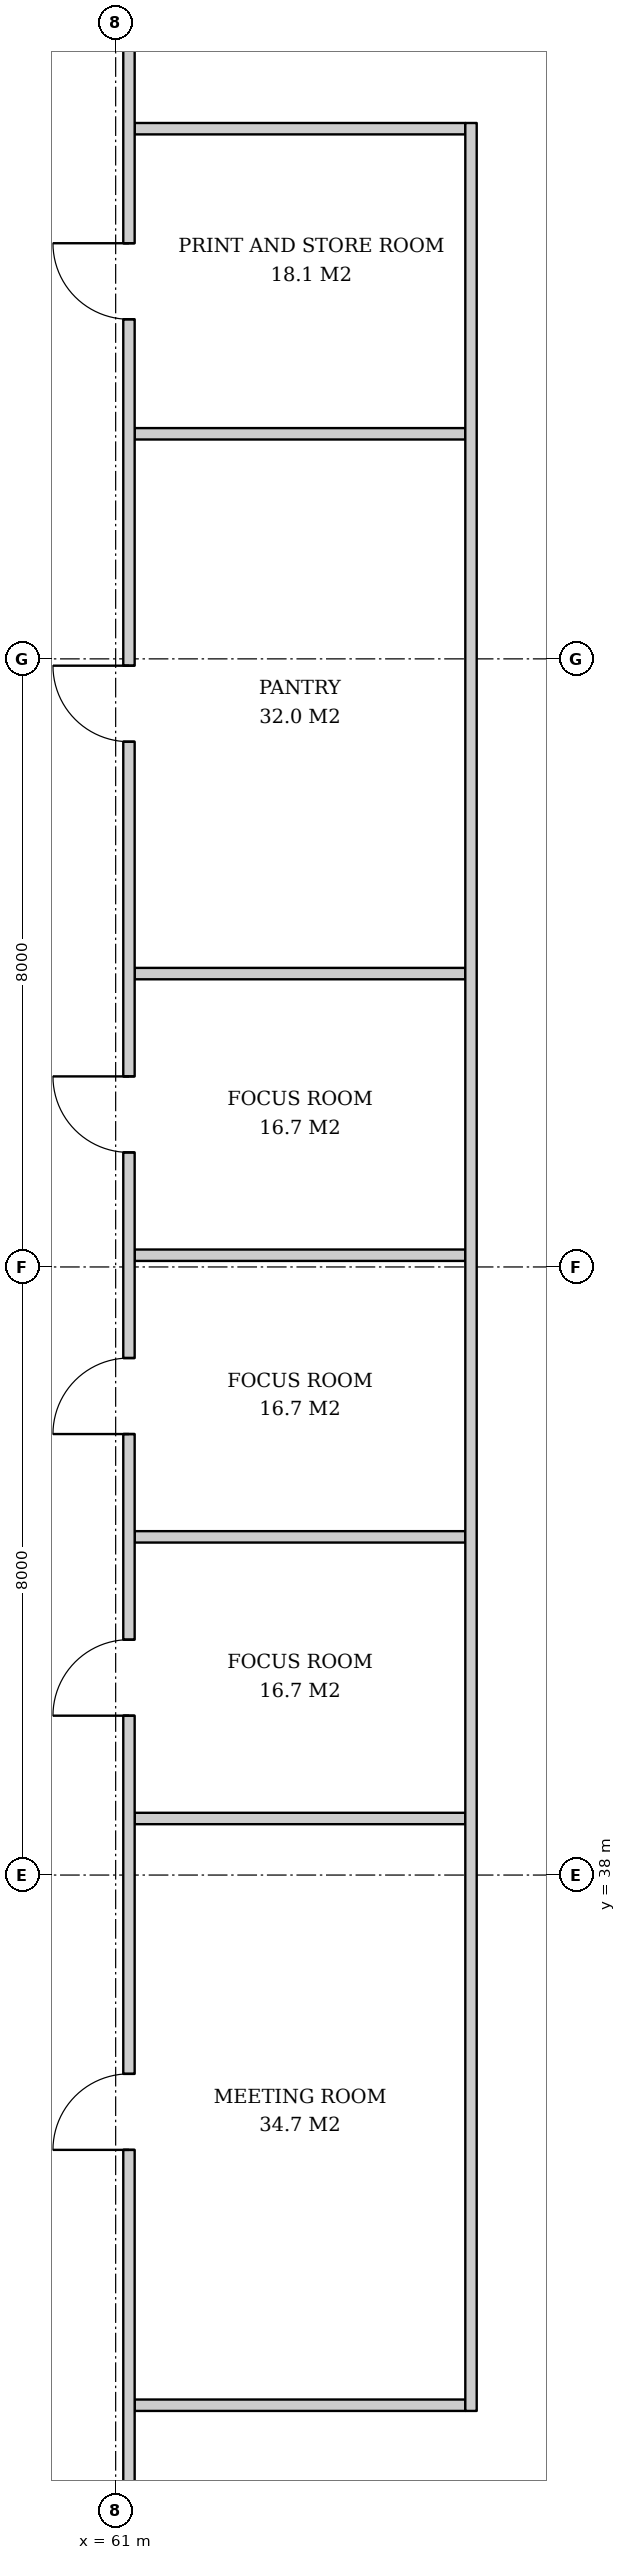
"""IFC4 building model, lengths in metres.
Left out: names, types, materials, properties, quantities, classifications, styles, units other than length and angle.
Written with IfcOpenShell. Run it as: python <this file> out.ifc"""

import sys

from ifc_helpers import new_model, si_unit, direction, frame, frame_2d, origin, place, context, subcontext, project, spatial, rectangle, extrude, element, fill, save


model = new_model("IFC4")
c1 = context("Model", 3, precision=1e-05, world=origin(), true_north=direction((0.0, 1.0)))
c2 = subcontext(c1, "Body", "Model", "MODEL_VIEW")
j1 = project(units=[si_unit("LENGTHUNIT", "METRE"), si_unit("PLANEANGLEUNIT", "RADIAN")], contexts=[c1])
p1 = place(None, origin())
s1 = spatial("IfcSite", under=j1, at=p1, CompositionType="ELEMENT")
p2 = place(p1, origin())
s2 = spatial("IfcBuilding", under=s1, at=p2, CompositionType="ELEMENT")
p3 = place(p2, frame((0.0, 0.0, 28.6)))
s3 = spatial("IfcBuildingStorey", under=s2, at=p3, CompositionType="ELEMENT", Elevation=28.6)
for number, where, z_axis, x_axis in (
    (1, (61.25, 31.025, 0.0), (0.0, 0.0, 1.0), (1.0, 0.0, 0.0)),
    (2, (61.25, 38.744, 0.0), (0.0, 0.0, 1.0), (1.0, 0.0, 0.0)),
    (3, (61.25, 42.449, 0.0), (0.0, 0.0, 1.0), (1.0, 0.0, 0.0)),
    (4, (61.25, 46.154, 0.0), (0.0, 0.0, 1.0), (1.0, 0.0, 0.0)),
    (5, (61.25, 49.86, 0.0), (0.0, 0.0, 1.0), (1.0, 0.0, 0.0)),
    (6, (61.25, 56.961, 0.0), (0.0, 0.0, 1.0), (1.0, 0.0, 0.0)),
    (7, (61.25, 60.975, 0.0), (0.0, 0.0, 1.0), (1.0, 0.0, 0.0)),
):
    element("IfcWall", number, at=place(p3, frame(where, z_axis=z_axis, x_axis=x_axis)), inside=s3, PredefinedType="PARTITIONING", context=c2, shape_type="SweptSolid", body=[
        extrude(rectangle(XDim=4.35, YDim=0.15, at=frame_2d((2.175, 0.0))), origin(), (0.0, 0.0, 1.0), 3.62),
    ])
p4 = place(p3, frame((65.675, 30.95, 0.0), z_axis=(0.0, 0.0, 1.0), x_axis=(0.0, 1.0, 0.0)))
e8 = element("IfcWall", 8, at=p4, inside=s3, PredefinedType="PARTITIONING", context=c2, shape_type="SweptSolid", body=[
    extrude(rectangle(XDim=30.1, YDim=0.15, at=frame_2d((15.05, 0.0))), origin(), (0.0, 0.0, 1.0), 2.612),
])
p5 = place(p3, frame((61.175, 29.75, 0.0), z_axis=(0.0, 0.0, 1.0), x_axis=(0.0, 1.0, 0.0)))
e9 = element("IfcWall", 9, at=p5, inside=s3, PredefinedType="PARTITIONING", context=c2, shape_type="SweptSolid", body=[
    extrude(rectangle(XDim=32.35, YDim=0.15, at=frame_2d((16.175, 0.0))), origin(), (0.0, 0.0, 1.0), 2.612),
])
p6 = place(p5, frame((4.635, 0.0, 0.0)))
e10 = element("IfcOpeningElement", 10, at=p6, cuts=e9, PredefinedType="OPENING", context=c2, shape_type="SweptSolid", body=[
    extrude(rectangle(XDim=1.0, YDim=2.1, at=frame_2d((0.5, 1.05))), frame((0.0, 0.085, 0.0), z_axis=(0.0, -1.0, 0.0), x_axis=(1.0, 0.0, 0.0)), (0.0, 0.0, 1.0), 0.17),
])
p7 = place(p5, frame((10.347, 0.0, 0.0)))
e11 = element("IfcOpeningElement", 11, at=p7, cuts=e9, PredefinedType="OPENING", context=c2, shape_type="SweptSolid", body=[
    extrude(rectangle(XDim=1.0, YDim=2.1, at=frame_2d((0.5, 1.05))), frame((0.0, 0.085, 0.0), z_axis=(0.0, -1.0, 0.0), x_axis=(1.0, 0.0, 0.0)), (0.0, 0.0, 1.0), 0.17),
])
p8 = place(p5, frame((14.052, 0.0, 0.0)))
e12 = element("IfcOpeningElement", 12, at=p8, cuts=e9, PredefinedType="OPENING", context=c2, shape_type="SweptSolid", body=[
    extrude(rectangle(XDim=1.0, YDim=2.1, at=frame_2d((0.5, 1.05))), frame((0.0, 0.085, 0.0), z_axis=(0.0, -1.0, 0.0), x_axis=(1.0, 0.0, 0.0)), (0.0, 0.0, 1.0), 0.17),
])
p9 = place(p5, frame((17.757, 0.0, 0.0)))
e13 = element("IfcOpeningElement", 13, at=p9, cuts=e9, PredefinedType="OPENING", context=c2, shape_type="SweptSolid", body=[
    extrude(rectangle(XDim=1.0, YDim=2.1, at=frame_2d((0.5, 1.05))), frame((0.0, 0.085, 0.0), z_axis=(0.0, -1.0, 0.0), x_axis=(1.0, 0.0, 0.0)), (0.0, 0.0, 1.0), 0.17),
])
p10 = place(p5, frame((23.16, 0.0, 0.0)))
e14 = element("IfcOpeningElement", 14, at=p10, cuts=e9, PredefinedType="OPENING", context=c2, shape_type="SweptSolid", body=[
    extrude(rectangle(XDim=1.0, YDim=2.1, at=frame_2d((0.5, 1.05))), frame((0.0, 0.085, 0.0), z_axis=(0.0, -1.0, 0.0), x_axis=(1.0, 0.0, 0.0)), (0.0, 0.0, 1.0), 0.17),
])
p11 = place(p5, frame((28.718, 0.0, 0.0)))
e15 = element("IfcOpeningElement", 15, at=p11, cuts=e9, PredefinedType="OPENING", context=c2, shape_type="SweptSolid", body=[
    extrude(rectangle(XDim=1.0, YDim=2.1, at=frame_2d((0.5, 1.05))), frame((0.0, 0.085, 0.0), z_axis=(0.0, -1.0, 0.0), x_axis=(1.0, 0.0, 0.0)), (0.0, 0.0, 1.0), 0.17),
])
p12 = place(p6, origin())
e16 = element("IfcDoor", 16, at=p12, inside=s3, OperationType="SINGLE_SWING_LEFT", PredefinedType="DOOR", context=c2, shape_type="SweptSolid", body=[
    extrude(rectangle(XDim=1.0, YDim=2.1, at=frame_2d((0.5, 1.05))), frame((0.0, 0.025, 0.0), z_axis=(0.0, -1.0, 0.0), x_axis=(1.0, 0.0, 0.0)), (0.0, 0.0, 1.0), 0.05),
])
fill(e10, e16)
p13 = place(p7, origin())
e17 = element("IfcDoor", 17, at=p13, inside=s3, OperationType="SINGLE_SWING_LEFT", PredefinedType="DOOR", context=c2, shape_type="SweptSolid", body=[
    extrude(rectangle(XDim=1.0, YDim=2.1, at=frame_2d((0.5, 1.05))), frame((0.0, 0.025, 0.0), z_axis=(0.0, -1.0, 0.0), x_axis=(1.0, 0.0, 0.0)), (0.0, 0.0, 1.0), 0.05),
])
fill(e11, e17)
p14 = place(p8, origin())
e18 = element("IfcDoor", 18, at=p14, inside=s3, OperationType="SINGLE_SWING_LEFT", PredefinedType="DOOR", context=c2, shape_type="SweptSolid", body=[
    extrude(rectangle(XDim=1.0, YDim=2.1, at=frame_2d((0.5, 1.05))), frame((0.0, 0.025, 0.0), z_axis=(0.0, -1.0, 0.0), x_axis=(1.0, 0.0, 0.0)), (0.0, 0.0, 1.0), 0.05),
])
fill(e12, e18)
p15 = place(p9, origin())
e19 = element("IfcDoor", 19, at=p15, inside=s3, OperationType="SINGLE_SWING_RIGHT", PredefinedType="DOOR", context=c2, shape_type="SweptSolid", body=[
    extrude(rectangle(XDim=1.0, YDim=2.1, at=frame_2d((0.5, 1.05))), frame((0.0, 0.025, 0.0), z_axis=(0.0, -1.0, 0.0), x_axis=(1.0, 0.0, 0.0)), (0.0, 0.0, 1.0), 0.05),
])
fill(e13, e19)
p16 = place(p10, origin())
e20 = element("IfcDoor", 20, at=p16, inside=s3, OperationType="SINGLE_SWING_RIGHT", PredefinedType="DOOR", context=c2, shape_type="SweptSolid", body=[
    extrude(rectangle(XDim=1.0, YDim=2.1, at=frame_2d((0.5, 1.05))), frame((0.0, 0.025, 0.0), z_axis=(0.0, -1.0, 0.0), x_axis=(1.0, 0.0, 0.0)), (0.0, 0.0, 1.0), 0.05),
])
fill(e14, e20)
p17 = place(p11, origin())
e21 = element("IfcDoor", 21, at=p17, inside=s3, OperationType="SINGLE_SWING_RIGHT", PredefinedType="DOOR", context=c2, shape_type="SweptSolid", body=[
    extrude(rectangle(XDim=1.0, YDim=2.1, at=frame_2d((0.5, 1.05))), frame((0.0, 0.025, 0.0), z_axis=(0.0, -1.0, 0.0), x_axis=(1.0, 0.0, 0.0)), (0.0, 0.0, 1.0), 0.05),
])
fill(e15, e21)
save(model, sys.argv[1])
